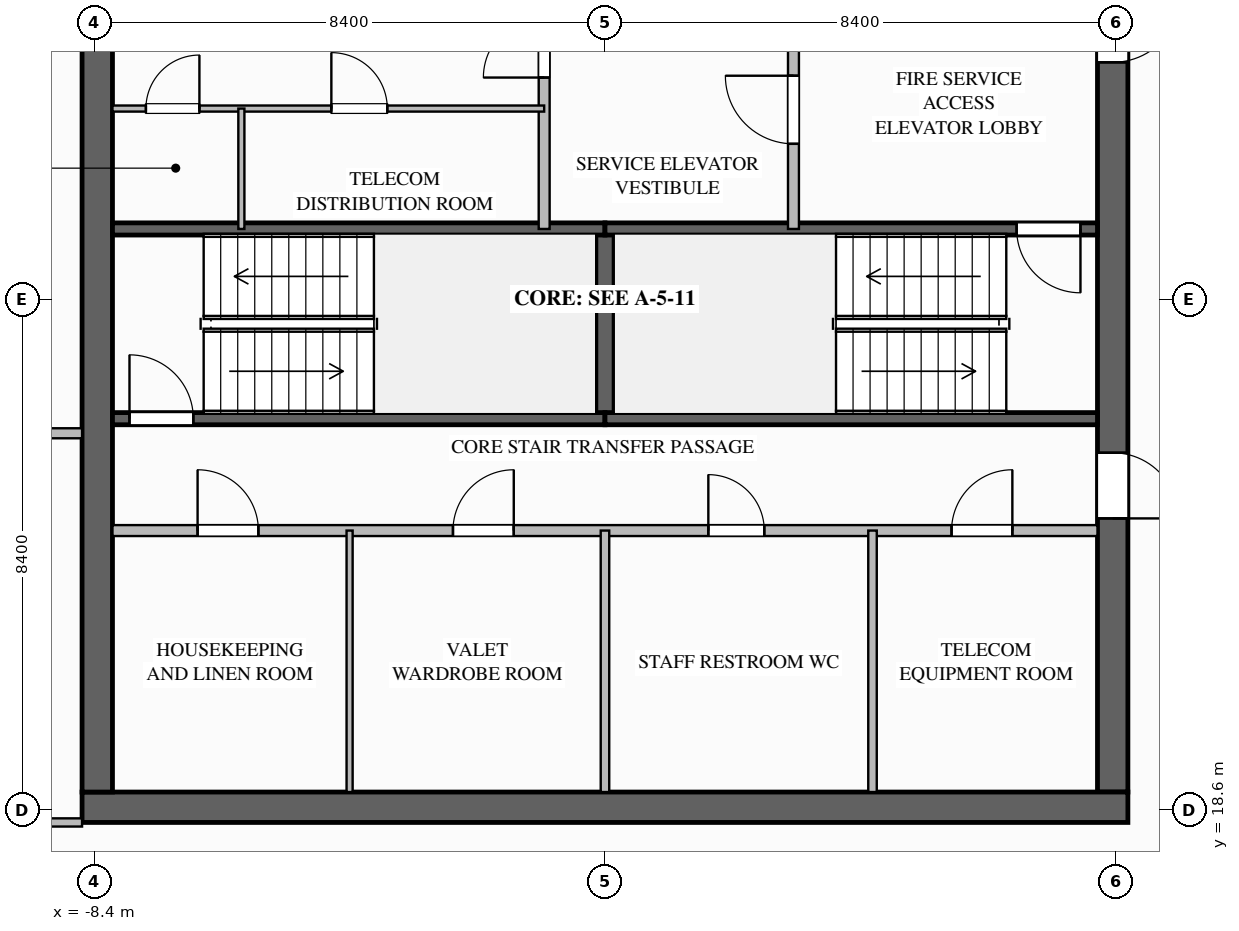
"""IFC4 building model, lengths in metres.
Left out: names, types, materials, properties, quantities, classifications, styles, units other than length and angle.
Written with IfcOpenShell. Run it as: python <this file> out.ifc"""

import sys

from ifc_helpers import new_model, si_unit, direction, frame, frame_2d, origin, place, context, subcontext, project, spatial, rectangle, extrude, element, fill, save


model = new_model("IFC4")
c1 = context("Model", 3, precision=1e-05, world=origin(), true_north=direction((0.0, 1.0)))
c2 = subcontext(c1, "Body", "Model", "MODEL_VIEW")
j1 = project(units=[si_unit("LENGTHUNIT", "METRE"), si_unit("PLANEANGLEUNIT", "RADIAN")], contexts=[c1])
p1 = place(None, origin())
s1 = spatial("IfcSite", under=j1, at=p1, CompositionType="ELEMENT")
p2 = place(p1, origin())
s2 = spatial("IfcBuilding", under=s1, at=p2, CompositionType="ELEMENT")
p3 = place(p2, frame((0.0, 0.0, 268.65)))
s3 = spatial("IfcBuildingStorey", under=s2, at=p3, CompositionType="ELEMENT", Elevation=268.65)
p4 = place(p3, frame((8.35, 35.1, 0.0), z_axis=(0.0, 0.0, 1.0), x_axis=(0.0, -1.0, 0.0)))
e1 = element("IfcWall", 1, at=p4, inside=s3, PredefinedType="SHEAR", context=c2, shape_type="SweptSolid", body=[
    extrude(rectangle(XDim=16.2, YDim=0.5, at=frame_2d((8.1, 0.0))), origin(), (0.0, 0.0, 1.0), 3.65),
])
p5 = place(p4, frame((3.08, 0.0, 0.0)))
e2 = element("IfcOpeningElement", 2, at=p5, cuts=e1, PredefinedType="OPENING", context=c2, shape_type="SweptSolid", body=[
    extrude(rectangle(XDim=1.12, YDim=2.1, at=frame_2d((0.56, 1.05))), frame((0.0, 0.26, 0.0), z_axis=(0.0, -1.0, 0.0), x_axis=(1.0, 0.0, 0.0)), (0.0, 0.0, 1.0), 0.52),
])
p6 = place(p4, frame((10.62, 0.0, 0.0)))
e3 = element("IfcOpeningElement", 3, at=p6, cuts=e1, PredefinedType="OPENING", context=c2, shape_type="SweptSolid", body=[
    extrude(rectangle(XDim=1.08, YDim=2.04, at=frame_2d((0.54, 1.02))), frame((0.0, 0.26, 0.0), z_axis=(0.0, -1.0, 0.0), x_axis=(1.0, 0.0, 0.0)), (0.0, 0.0, 1.0), 0.52),
])
p7 = place(p3, frame((8.6, 18.65, 0.0), z_axis=(0.0, 0.0, 1.0), x_axis=(-1.0, 0.0, 0.0)))
e4 = element("IfcWall", 4, at=p7, inside=s3, PredefinedType="SHEAR", context=c2, shape_type="SweptSolid", body=[
    extrude(rectangle(XDim=17.2, YDim=0.5, at=frame_2d((8.6, 0.0))), origin(), (0.0, 0.0, 1.0), 3.65),
])
p8 = place(p3, frame((-8.35, 18.9, 0.0), z_axis=(0.0, 0.0, 1.0), x_axis=(0.0, 1.0, 0.0)))
e5 = element("IfcWall", 5, at=p8, inside=s3, PredefinedType="SHEAR", context=c2, shape_type="SweptSolid", body=[
    extrude(rectangle(XDim=16.2, YDim=0.5, at=frame_2d((8.1, 0.0))), origin(), (0.0, 0.0, 1.0), 3.65),
])
p9 = place(p3, frame((0.0, 25.04, 0.0), z_axis=(0.0, 0.0, 1.0), x_axis=(0.0, 1.0, 0.0)))
e6 = element("IfcWall", 6, at=p9, inside=s3, PredefinedType="SOLIDWALL", context=c2, shape_type="SweptSolid", body=[
    extrude(rectangle(XDim=3.12, YDim=0.3, at=frame_2d((1.56, 0.0))), origin(), (0.0, 0.0, 1.0), 3.39),
])
p10 = place(p3, frame((-8.1, 25.04, 0.0), z_axis=(0.0, 0.0, 1.0), x_axis=(1.0, 0.0, 0.0)))
e7 = element("IfcWall", 7, at=p10, inside=s3, PredefinedType="SOLIDWALL", context=c2, shape_type="SweptSolid", body=[
    extrude(rectangle(XDim=8.1, YDim=0.2, at=frame_2d((4.05, 0.0))), origin(), (0.0, 0.0, 1.0), 3.39),
])
p11 = place(p10, frame((0.28, 0.0, 0.0)))
e8 = element("IfcOpeningElement", 8, at=p11, cuts=e7, PredefinedType="OPENING", context=c2, shape_type="SweptSolid", body=[
    extrude(rectangle(XDim=1.05, YDim=2.1, at=frame_2d((0.525, 1.05))), frame((0.0, 0.11, 0.0), z_axis=(0.0, -1.0, 0.0), x_axis=(1.0, 0.0, 0.0)), (0.0, 0.0, 1.0), 0.22),
])
for number, where, z_axis, x_axis in (
    (9, (-8.1, 28.16, 0.0), (0.0, 0.0, 1.0), (1.0, 0.0, 0.0)),
    (10, (0.0, 25.04, 0.0), (0.0, 0.0, 1.0), (1.0, 0.0, 0.0)),
):
    element("IfcWall", number, at=place(p3, frame(where, z_axis=z_axis, x_axis=x_axis)), inside=s3, PredefinedType="SOLIDWALL", context=c2, shape_type="SweptSolid", body=[
        extrude(rectangle(XDim=8.1, YDim=0.2, at=frame_2d((4.05, 0.0))), origin(), (0.0, 0.0, 1.0), 3.39),
    ])
p12 = place(p3, frame((8.1, 28.16, 0.0), z_axis=(0.0, 0.0, 1.0), x_axis=(-1.0, 0.0, 0.0)))
e11 = element("IfcWall", 11, at=p12, inside=s3, PredefinedType="SOLIDWALL", context=c2, shape_type="SweptSolid", body=[
    extrude(rectangle(XDim=8.1, YDim=0.2, at=frame_2d((4.05, 0.0))), origin(), (0.0, 0.0, 1.0), 3.39),
])
p13 = place(p12, frame((0.28, 0.0, 0.0)))
e12 = element("IfcOpeningElement", 12, at=p13, cuts=e11, PredefinedType="OPENING", context=c2, shape_type="SweptSolid", body=[
    extrude(rectangle(XDim=1.05, YDim=2.1, at=frame_2d((0.525, 1.05))), frame((0.0, 0.11, 0.0), z_axis=(0.0, -1.0, 0.0), x_axis=(1.0, 0.0, 0.0)), (0.0, 0.0, 1.0), 0.22),
])
p14 = place(p3, frame((3.1, 28.16, 0.0), z_axis=(0.0, 0.0, 1.0), x_axis=(0.0, 1.0, 0.0)))
e13 = element("IfcWall", 13, at=p14, inside=s3, PredefinedType="SOLIDWALL", context=c2, shape_type="SweptSolid", body=[
    extrude(rectangle(XDim=4.06, YDim=0.18, at=frame_2d((2.03, 0.0))), origin(), (0.0, 0.0, 1.0), 3.39),
])
p15 = place(p14, frame((1.4, 0.0, 0.0)))
e14 = element("IfcOpeningElement", 14, at=p15, cuts=e13, PredefinedType="OPENING", context=c2, shape_type="SweptSolid", body=[
    extrude(rectangle(XDim=1.12, YDim=2.1, at=frame_2d((0.56, 1.05))), frame((0.0, 0.1, 0.0), z_axis=(0.0, -1.0, 0.0), x_axis=(1.0, 0.0, 0.0)), (0.0, 0.0, 1.0), 0.2),
])
p16 = place(p3, frame((-1.0, 28.16, 0.0), z_axis=(0.0, 0.0, 1.0), x_axis=(0.0, 1.0, 0.0)))
e15 = element("IfcWall", 15, at=p16, inside=s3, PredefinedType="SOLIDWALL", context=c2, shape_type="SweptSolid", body=[
    extrude(rectangle(XDim=4.02, YDim=0.18, at=frame_2d((2.01, 0.0))), origin(), (0.0, 0.0, 1.0), 3.39),
])
p17 = place(p16, frame((2.49, 0.0, 0.0)))
e16 = element("IfcOpeningElement", 16, at=p17, cuts=e15, PredefinedType="OPENING", context=c2, shape_type="SweptSolid", body=[
    extrude(rectangle(XDim=1.0, YDim=2.1, at=frame_2d((0.5, 1.05))), frame((0.0, 0.1, 0.0), z_axis=(0.0, -1.0, 0.0), x_axis=(1.0, 0.0, 0.0)), (0.0, 0.0, 1.0), 0.2),
])
p18 = place(p3, frame((-8.1, 30.14, 0.0), z_axis=(0.0, 0.0, 1.0), x_axis=(1.0, 0.0, 0.0)))
e17 = element("IfcWall", 17, at=p18, inside=s3, PredefinedType="PARTITIONING", context=c2, shape_type="SweptSolid", body=[
    extrude(rectangle(XDim=7.1, YDim=0.1, at=frame_2d((3.55, 0.0))), origin(), (0.0, 0.0, 1.0), 3.39),
])
p19 = place(p18, frame((0.55, 0.0, 0.0)))
e18 = element("IfcOpeningElement", 18, at=p19, cuts=e17, PredefinedType="OPENING", context=c2, shape_type="SweptSolid", body=[
    extrude(rectangle(XDim=0.88, YDim=2.1, at=frame_2d((0.44, 1.05))), frame((0.0, 0.06, 0.0), z_axis=(0.0, -1.0, 0.0), x_axis=(1.0, 0.0, 0.0)), (0.0, 0.0, 1.0), 0.12),
])
p20 = place(p18, frame((3.6, 0.0, 0.0)))
e19 = element("IfcOpeningElement", 19, at=p20, cuts=e17, PredefinedType="OPENING", context=c2, shape_type="SweptSolid", body=[
    extrude(rectangle(XDim=0.92, YDim=2.1, at=frame_2d((0.46, 1.05))), frame((0.0, 0.06, 0.0), z_axis=(0.0, -1.0, 0.0), x_axis=(1.0, 0.0, 0.0)), (0.0, 0.0, 1.0), 0.12),
])
p21 = place(p3, frame((-5.98, 28.16, 0.0), z_axis=(0.0, 0.0, 1.0), x_axis=(0.0, 1.0, 0.0)))
e20 = element("IfcWall", 20, at=p21, inside=s3, PredefinedType="PARTITIONING", context=c2, shape_type="SweptSolid", body=[
    extrude(rectangle(XDim=1.98, YDim=0.1, at=frame_2d((0.99, 0.0))), origin(), (0.0, 0.0, 1.0), 3.39),
])
p22 = place(p3, frame((-8.1, 23.2, 0.0), z_axis=(0.0, 0.0, 1.0), x_axis=(1.0, 0.0, 0.0)))
e21 = element("IfcWall", 21, at=p22, inside=s3, PredefinedType="SOLIDWALL", context=c2, shape_type="SweptSolid", body=[
    extrude(rectangle(XDim=16.2, YDim=0.18, at=frame_2d((8.1, 0.0))), origin(), (0.0, 0.0, 1.0), 3.39),
])
p23 = place(p22, frame((1.4, 0.0, 0.0)))
e22 = element("IfcOpeningElement", 22, at=p23, cuts=e21, PredefinedType="OPENING", context=c2, shape_type="SweptSolid", body=[
    extrude(rectangle(XDim=1.0, YDim=2.1, at=frame_2d((0.5, 1.05))), frame((0.0, 0.1, 0.0), z_axis=(0.0, -1.0, 0.0), x_axis=(1.0, 0.0, 0.0)), (0.0, 0.0, 1.0), 0.2),
])
p24 = place(p22, frame((5.6, 0.0, 0.0)))
e23 = element("IfcOpeningElement", 23, at=p24, cuts=e21, PredefinedType="OPENING", context=c2, shape_type="SweptSolid", body=[
    extrude(rectangle(XDim=1.0, YDim=2.1, at=frame_2d((0.5, 1.05))), frame((0.0, 0.1, 0.0), z_axis=(0.0, -1.0, 0.0), x_axis=(1.0, 0.0, 0.0)), (0.0, 0.0, 1.0), 0.2),
])
p25 = place(p22, frame((9.8, 0.0, 0.0)))
e24 = element("IfcOpeningElement", 24, at=p25, cuts=e21, PredefinedType="OPENING", context=c2, shape_type="SweptSolid", body=[
    extrude(rectangle(XDim=0.92, YDim=2.1, at=frame_2d((0.46, 1.05))), frame((0.0, 0.1, 0.0), z_axis=(0.0, -1.0, 0.0), x_axis=(1.0, 0.0, 0.0)), (0.0, 0.0, 1.0), 0.2),
])
p26 = place(p22, frame((13.8, 0.0, 0.0)))
e25 = element("IfcOpeningElement", 25, at=p26, cuts=e21, PredefinedType="OPENING", context=c2, shape_type="SweptSolid", body=[
    extrude(rectangle(XDim=1.0, YDim=2.1, at=frame_2d((0.5, 1.05))), frame((0.0, 0.1, 0.0), z_axis=(0.0, -1.0, 0.0), x_axis=(1.0, 0.0, 0.0)), (0.0, 0.0, 1.0), 0.2),
])
p27 = place(p3, frame((-4.2, 18.9, 0.0), z_axis=(0.0, 0.0, 1.0), x_axis=(0.0, 1.0, 0.0)))
e26 = element("IfcWall", 26, at=p27, inside=s3, PredefinedType="PARTITIONING", context=c2, shape_type="SweptSolid", body=[
    extrude(rectangle(XDim=4.3, YDim=0.1, at=frame_2d((2.15, 0.0))), origin(), (0.0, 0.0, 1.0), 3.39),
])
for number, where, z_axis, x_axis in (
    (27, (0.0, 18.9, 0.0), (0.0, 0.0, 1.0), (0.0, 1.0, 0.0)),
    (28, (4.4, 18.9, 0.0), (0.0, 0.0, 1.0), (0.0, 1.0, 0.0)),
):
    element("IfcWall", number, at=place(p3, frame(where, z_axis=z_axis, x_axis=x_axis)), inside=s3, PredefinedType="PLUMBINGWALL", context=c2, shape_type="SweptSolid", body=[
        extrude(rectangle(XDim=4.3, YDim=0.14, at=frame_2d((2.15, 0.0))), origin(), (0.0, 0.0, 1.0), 3.39),
    ])
p28 = place(p3, frame((-16.2, 18.4, 0.0), z_axis=(0.0, 0.0, 1.0), x_axis=(1.0, 0.0, 0.0)))
e29 = element("IfcWall", 29, at=p28, inside=s3, PredefinedType="PARTITIONING", context=c2, shape_type="SweptSolid", body=[
    extrude(rectangle(XDim=7.6, YDim=0.135, at=frame_2d((3.8, 0.0))), origin(), (0.0, 0.0, 1.0), 2.768),
])
p29 = place(p28, frame((4.585, 0.0, 0.0)))
e30 = element("IfcOpeningElement", 30, at=p29, cuts=e29, PredefinedType="OPENING", context=c2, shape_type="SweptSolid", body=[
    extrude(rectangle(XDim=1.26, YDim=2.2, at=frame_2d((0.63, 1.1))), frame((0.0, 0.077, 0.0), z_axis=(0.0, -1.0, 0.0), x_axis=(1.0, 0.0, 0.0)), (0.0, 0.0, 1.0), 0.155),
])
p30 = place(p3, frame((-21.4, 24.8, 0.0), z_axis=(0.0, 0.0, 1.0), x_axis=(1.0, 0.0, 0.0)))
e31 = element("IfcWall", 31, at=p30, inside=s3, PredefinedType="PARTITIONING", context=c2, shape_type="SweptSolid", body=[
    extrude(rectangle(XDim=12.8, YDim=0.165, at=frame_2d((6.4, 0.0))), origin(), (0.0, 0.0, 1.0), 3.39),
])
p31 = place(p11, origin())
e32 = element("IfcDoor", 32, at=p31, inside=s3, OperationType="SINGLE_SWING_LEFT", PredefinedType="DOOR", context=c2, shape_type="SweptSolid", body=[
    extrude(rectangle(XDim=1.05, YDim=2.1, at=frame_2d((0.525, 1.05))), frame((0.0, 0.025, 0.0), z_axis=(0.0, -1.0, 0.0), x_axis=(1.0, 0.0, 0.0)), (0.0, 0.0, 1.0), 0.05),
])
fill(e8, e32)
p32 = place(p13, origin())
e33 = element("IfcDoor", 33, at=p32, inside=s3, OperationType="SINGLE_SWING_LEFT", PredefinedType="DOOR", context=c2, shape_type="SweptSolid", body=[
    extrude(rectangle(XDim=1.05, YDim=2.1, at=frame_2d((0.525, 1.05))), frame((0.0, 0.025, 0.0), z_axis=(0.0, -1.0, 0.0), x_axis=(1.0, 0.0, 0.0)), (0.0, 0.0, 1.0), 0.05),
])
fill(e12, e33)
p33 = place(p15, origin())
e34 = element("IfcDoor", 34, at=p33, inside=s3, OperationType="SINGLE_SWING_RIGHT", PredefinedType="DOOR", context=c2, shape_type="SweptSolid", body=[
    extrude(rectangle(XDim=1.12, YDim=2.1, at=frame_2d((0.56, 1.05))), frame((0.0, 0.025, 0.0), z_axis=(0.0, -1.0, 0.0), x_axis=(1.0, 0.0, 0.0)), (0.0, 0.0, 1.0), 0.05),
])
fill(e14, e34)
p34 = place(p5, origin())
e35 = element("IfcDoor", 35, at=p34, inside=s3, OperationType="SINGLE_SWING_LEFT", PredefinedType="DOOR", context=c2, shape_type="SweptSolid", body=[
    extrude(rectangle(XDim=1.12, YDim=2.1, at=frame_2d((0.56, 1.05))), frame((0.0, 0.025, 0.0), z_axis=(0.0, -1.0, 0.0), x_axis=(1.0, 0.0, 0.0)), (0.0, 0.0, 1.0), 0.05),
])
fill(e2, e35)
p35 = place(p17, origin())
e36 = element("IfcDoor", 36, at=p35, inside=s3, OperationType="SINGLE_SWING_LEFT", PredefinedType="DOOR", context=c2, shape_type="SweptSolid", body=[
    extrude(rectangle(XDim=1.0, YDim=2.1, at=frame_2d((0.5, 1.05))), frame((0.0, 0.025, 0.0), z_axis=(0.0, -1.0, 0.0), x_axis=(1.0, 0.0, 0.0)), (0.0, 0.0, 1.0), 0.05),
])
fill(e16, e36)
p36 = place(p19, origin())
e37 = element("IfcDoor", 37, at=p36, inside=s3, OperationType="SINGLE_SWING_RIGHT", PredefinedType="DOOR", context=c2, shape_type="SweptSolid", body=[
    extrude(rectangle(XDim=0.88, YDim=2.1, at=frame_2d((0.44, 1.05))), frame((0.0, 0.025, 0.0), z_axis=(0.0, -1.0, 0.0), x_axis=(1.0, 0.0, 0.0)), (0.0, 0.0, 1.0), 0.05),
])
fill(e18, e37)
p37 = place(p20, origin())
e38 = element("IfcDoor", 38, at=p37, inside=s3, OperationType="SINGLE_SWING_LEFT", PredefinedType="DOOR", context=c2, shape_type="SweptSolid", body=[
    extrude(rectangle(XDim=0.92, YDim=2.1, at=frame_2d((0.46, 1.05))), frame((0.0, 0.025, 0.0), z_axis=(0.0, -1.0, 0.0), x_axis=(1.0, 0.0, 0.0)), (0.0, 0.0, 1.0), 0.05),
])
fill(e19, e38)
p38 = place(p6, origin())
e39 = element("IfcDoor", 39, at=p38, inside=s3, OperationType="SINGLE_SWING_RIGHT", PredefinedType="DOOR", context=c2, shape_type="SweptSolid", body=[
    extrude(rectangle(XDim=1.08, YDim=2.04, at=frame_2d((0.54, 1.02))), frame((0.0, 0.025, 0.0), z_axis=(0.0, -1.0, 0.0), x_axis=(1.0, 0.0, 0.0)), (0.0, 0.0, 1.0), 0.05),
])
fill(e3, e39)
p39 = place(p23, origin())
e40 = element("IfcDoor", 40, at=p39, inside=s3, OperationType="SINGLE_SWING_LEFT", PredefinedType="DOOR", context=c2, shape_type="SweptSolid", body=[
    extrude(rectangle(XDim=1.0, YDim=2.1, at=frame_2d((0.5, 1.05))), frame((0.0, 0.025, 0.0), z_axis=(0.0, -1.0, 0.0), x_axis=(1.0, 0.0, 0.0)), (0.0, 0.0, 1.0), 0.05),
])
fill(e22, e40)
p40 = place(p24, origin())
e41 = element("IfcDoor", 41, at=p40, inside=s3, OperationType="SINGLE_SWING_RIGHT", PredefinedType="DOOR", context=c2, shape_type="SweptSolid", body=[
    extrude(rectangle(XDim=1.0, YDim=2.1, at=frame_2d((0.5, 1.05))), frame((0.0, 0.025, 0.0), z_axis=(0.0, -1.0, 0.0), x_axis=(1.0, 0.0, 0.0)), (0.0, 0.0, 1.0), 0.05),
])
fill(e23, e41)
p41 = place(p25, origin())
e42 = element("IfcDoor", 42, at=p41, inside=s3, OperationType="SINGLE_SWING_LEFT", PredefinedType="DOOR", context=c2, shape_type="SweptSolid", body=[
    extrude(rectangle(XDim=0.92, YDim=2.1, at=frame_2d((0.46, 1.05))), frame((0.0, 0.025, 0.0), z_axis=(0.0, -1.0, 0.0), x_axis=(1.0, 0.0, 0.0)), (0.0, 0.0, 1.0), 0.05),
])
fill(e24, e42)
p42 = place(p26, origin())
e43 = element("IfcDoor", 43, at=p42, inside=s3, OperationType="SINGLE_SWING_RIGHT", PredefinedType="DOOR", context=c2, shape_type="SweptSolid", body=[
    extrude(rectangle(XDim=1.0, YDim=2.1, at=frame_2d((0.5, 1.05))), frame((0.0, 0.025, 0.0), z_axis=(0.0, -1.0, 0.0), x_axis=(1.0, 0.0, 0.0)), (0.0, 0.0, 1.0), 0.05),
])
fill(e25, e43)
save(model, sys.argv[1])
